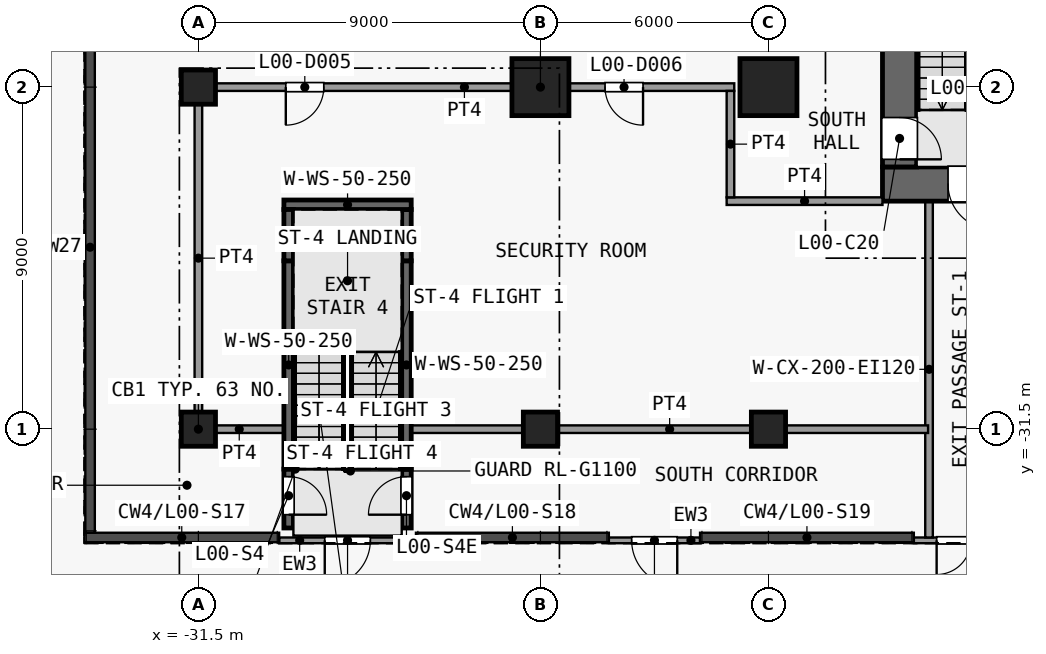
"""IFC4 building model, lengths in metres.
Left out: names, types, materials, properties, quantities, classifications, styles, units other than length and angle.
Written with IfcOpenShell. Run it as: python <this file> out.ifc"""

import sys

from ifc_helpers import new_model, si_unit, direction, frame, frame_2d, origin, origin_2d, place, context, subcontext, project, spatial, rectangle, extrude, element, fill, save


model = new_model("IFC4")
c1 = context("Model", 3, precision=1e-05, world=origin(), true_north=direction((0.0, 1.0)))
c2 = subcontext(c1, "Body", "Model", "MODEL_VIEW")
j1 = project(units=[si_unit("LENGTHUNIT", "METRE"), si_unit("PLANEANGLEUNIT", "RADIAN")], contexts=[c1])
p1 = place(None, origin())
s1 = spatial("IfcSite", under=j1, at=p1, CompositionType="ELEMENT")
p2 = place(p1, origin())
s2 = spatial("IfcBuilding", under=s1, at=p2, CompositionType="ELEMENT")
p3 = place(p2, origin())
s3 = spatial("IfcBuildingStorey", under=s2, at=p3, CompositionType="ELEMENT", Elevation=0.0)
for number, where, z_axis, x_axis in (
    (1, (-31.5, -31.5, 0.0), (0.0, 0.0, 1.0), (1.0, 0.0, 0.0)),
    (2, (-31.5, -22.5, 0.0), (0.0, 0.0, 1.0), (1.0, 0.0, 0.0)),
    (3, (-22.5, -31.5, 0.0), (0.0, 0.0, 1.0), (1.0, 0.0, 0.0)),
):
    element("IfcColumn", number, at=place(p3, frame(where, z_axis=z_axis, x_axis=x_axis)), inside=s3, PredefinedType="COLUMN", context=c2, shape_type="SweptSolid", body=[
        extrude(rectangle(XDim=0.9, YDim=0.9, at=origin_2d()), origin(), (0.0, 0.0, 1.0), 8.0),
    ])
p4 = place(p3, frame((-22.5, -22.5, 0.0), z_axis=(0.0, 0.0, 1.0), x_axis=(1.0, 0.0, 0.0)))
e4 = element("IfcColumn", 4, at=p4, inside=s3, PredefinedType="COLUMN", context=c2, shape_type="SweptSolid", body=[
    extrude(rectangle(XDim=1.5, YDim=1.5, at=origin_2d()), origin(), (0.0, 0.0, 1.0), 8.0),
])
p5 = place(p3, frame((-16.5, -31.5, 0.0), z_axis=(0.0, 0.0, 1.0), x_axis=(1.0, 0.0, 0.0)))
e5 = element("IfcColumn", 5, at=p5, inside=s3, PredefinedType="COLUMN", context=c2, shape_type="SweptSolid", body=[
    extrude(rectangle(XDim=0.9, YDim=0.9, at=origin_2d()), origin(), (0.0, 0.0, 1.0), 8.0),
])
p6 = place(p3, frame((-16.5, -22.5, 0.0), z_axis=(0.0, 0.0, 1.0), x_axis=(1.0, 0.0, 0.0)))
e6 = element("IfcColumn", 6, at=p6, inside=s3, PredefinedType="COLUMN", context=c2, shape_type="SweptSolid", body=[
    extrude(rectangle(XDim=1.5, YDim=1.5, at=origin_2d()), origin(), (0.0, 0.0, 1.0), 8.0),
])
p7 = place(p3, frame((13.5, -25.05, 0.0), z_axis=(0.0, 0.0, 1.0), x_axis=(-1.0, 0.0, 0.0)))
e7 = element("IfcWall", 7, at=p7, inside=s3, PredefinedType="SHEAR", context=c2, shape_type="SweptSolid", body=[
    extrude(rectangle(XDim=27.0, YDim=0.9, at=frame_2d((13.5, 0.0))), origin(), (0.0, 0.0, 1.0), 7.65),
])
p8 = place(p7, frame((24.075, 0.0, 0.0)))
e8 = element("IfcOpeningElement", 8, at=p8, cuts=e7, PredefinedType="OPENING", context=c2, shape_type="SweptSolid", body=[
    extrude(rectangle(XDim=1.2, YDim=2.1, at=frame_2d((0.6, 1.05))), frame((0.0, 0.46, 0.0), z_axis=(0.0, -1.0, 0.0), x_axis=(1.0, 0.0, 0.0)), (0.0, 0.0, 1.0), 0.92),
])
p9 = place(p7, frame((1.725, 0.0, 0.0)))
e9 = element("IfcOpeningElement", 9, at=p9, cuts=e7, PredefinedType="OPENING", context=c2, shape_type="SweptSolid", body=[
    extrude(rectangle(XDim=1.2, YDim=2.1, at=frame_2d((0.6, 1.05))), frame((0.0, 0.46, 0.0), z_axis=(0.0, -1.0, 0.0), x_axis=(1.0, 0.0, 0.0)), (0.0, 0.0, 1.0), 0.92),
])
p10 = place(p3, frame((-13.05, -8.5, 0.0), z_axis=(0.0, 0.0, 1.0), x_axis=(0.0, -1.0, 0.0)))
e10 = element("IfcWall", 10, at=p10, inside=s3, PredefinedType="SHEAR", context=c2, shape_type="SweptSolid", body=[
    extrude(rectangle(XDim=16.1, YDim=0.9, at=frame_2d((8.05, 0.0))), origin(), (0.0, 0.0, 1.0), 7.65),
])
p11 = place(p10, frame((14.8, 0.0, 0.0)))
e11 = element("IfcOpeningElement", 11, at=p11, cuts=e10, PredefinedType="OPENING", context=c2, shape_type="SweptSolid", body=[
    extrude(rectangle(XDim=1.1, YDim=2.1, at=frame_2d((0.55, 1.05))), frame((0.0, 0.46, 0.0), z_axis=(0.0, -1.0, 0.0), x_axis=(1.0, 0.0, 0.0)), (0.0, 0.0, 1.0), 0.92),
])
p12 = place(p3, frame((-12.275, -25.5, 0.0), z_axis=(0.0, 0.0, 1.0), x_axis=(0.0, -1.0, 0.0)))
e12 = element("IfcWall", 12, at=p12, inside=s3, PredefinedType="PARTITIONING", context=c2, shape_type="SweptSolid", body=[
    extrude(rectangle(XDim=8.85, YDim=0.2, at=frame_2d((4.425, 0.0))), origin(), (0.0, 0.0, 1.0), 7.65),
])
p13 = place(p3, frame((-9.675, -34.425, 0.0), z_axis=(0.0, 0.0, 1.0), x_axis=(-1.0, 0.0, 0.0)))
e13 = element("IfcWall", 13, at=p13, inside=s3, PredefinedType="SOLIDWALL", context=c2, shape_type="SweptSolid", body=[
    extrude(rectangle(XDim=3.0, YDim=0.15, at=frame_2d((1.5, 0.0))), origin(), (0.0, 0.0, 1.0), 7.65),
])
p14 = place(p13, frame((0.6, 0.0, 0.0)))
e14 = element("IfcOpeningElement", 14, at=p14, cuts=e13, PredefinedType="OPENING", context=c2, shape_type="SweptSolid", body=[
    extrude(rectangle(XDim=1.8, YDim=2.1, at=frame_2d((0.9, 1.05))), frame((0.0, 0.085, 0.0), z_axis=(0.0, -1.0, 0.0), x_axis=(1.0, 0.0, 0.0)), (0.0, 0.0, 1.0), 0.17),
])
p15 = place(p3, frame((-25.775, -34.425, 0.0), z_axis=(0.0, 0.0, 1.0), x_axis=(-1.0, 0.0, 0.0)))
e15 = element("IfcWall", 15, at=p15, inside=s3, PredefinedType="SOLIDWALL", context=c2, shape_type="SweptSolid", body=[
    extrude(rectangle(XDim=3.6, YDim=0.15, at=frame_2d((1.8, 0.0))), origin(), (0.0, 0.0, 1.0), 7.65),
])
p16 = place(p15, frame((1.2, 0.0, 0.0)))
e16 = element("IfcOpeningElement", 16, at=p16, cuts=e15, PredefinedType="OPENING", context=c2, shape_type="SweptSolid", body=[
    extrude(rectangle(XDim=1.2, YDim=2.4, at=frame_2d((0.6, 1.2))), frame((0.0, 0.085, 0.0), z_axis=(0.0, -1.0, 0.0), x_axis=(1.0, 0.0, 0.0)), (0.0, 0.0, 1.0), 0.17),
])
p17 = place(p3, frame((-18.3, -34.425, 0.0), z_axis=(0.0, 0.0, 1.0), x_axis=(-1.0, 0.0, 0.0)))
e17 = element("IfcWall", 17, at=p17, inside=s3, PredefinedType="SOLIDWALL", context=c2, shape_type="SweptSolid", body=[
    extrude(rectangle(XDim=2.4, YDim=0.15, at=frame_2d((1.2, 0.0))), origin(), (0.0, 0.0, 1.0), 7.65),
])
p18 = place(p17, frame((0.6, 0.0, 0.0)))
e18 = element("IfcOpeningElement", 18, at=p18, cuts=e17, PredefinedType="OPENING", context=c2, shape_type="SweptSolid", body=[
    extrude(rectangle(XDim=1.2, YDim=2.4, at=frame_2d((0.6, 1.2))), frame((0.0, 0.085, 0.0), z_axis=(0.0, -1.0, 0.0), x_axis=(1.0, 0.0, 0.0)), (0.0, 0.0, 1.0), 0.17),
])
p19 = place(p3, frame((-29.125, -32.55, 0.0), z_axis=(0.0, 0.0, 1.0), x_axis=(0.0, -1.0, 0.0)))
e19 = element("IfcWall", 19, at=p19, inside=s3, PredefinedType="SHEAR", context=c2, shape_type="SweptSolid", body=[
    extrude(rectangle(XDim=1.55, YDim=0.25, at=frame_2d((0.775, 0.0))), origin(), (0.0, 0.0, 1.0), 7.65),
])
p20 = place(p19, frame((0.2, 0.0, 0.0)))
e20 = element("IfcOpeningElement", 20, at=p20, cuts=e19, PredefinedType="OPENING", context=c2, shape_type="SweptSolid", body=[
    extrude(rectangle(XDim=1.0, YDim=2.1, at=frame_2d((0.5, 1.05))), frame((0.0, 0.135, 0.0), z_axis=(0.0, -1.0, 0.0), x_axis=(1.0, 0.0, 0.0)), (0.0, 0.0, 1.0), 0.27),
])
p21 = place(p3, frame((-29.125, -32.55, 0.0), z_axis=(0.0, 0.0, 1.0), x_axis=(0.0, 1.0, 0.0)))
e21 = element("IfcWall", 21, at=p21, inside=s3, PredefinedType="SHEAR", context=c2, shape_type="SweptSolid", body=[
    extrude(rectangle(XDim=5.48, YDim=0.25, at=frame_2d((2.74, 0.0))), origin(), (0.0, 0.0, 1.0), 7.65),
])
p22 = place(p3, frame((-29.125, -27.07, 0.0), z_axis=(0.0, 0.0, 1.0), x_axis=(0.0, 1.0, 0.0)))
e22 = element("IfcWall", 22, at=p22, inside=s3, PredefinedType="SHEAR", context=c2, shape_type="SweptSolid", body=[
    extrude(rectangle(XDim=1.35, YDim=0.25, at=frame_2d((0.675, 0.0))), origin(), (0.0, 0.0, 1.0), 7.65),
])
p23 = place(p3, frame((-26.025, -34.1, 0.0), z_axis=(0.0, 0.0, 1.0), x_axis=(0.0, 1.0, 0.0)))
e23 = element("IfcWall", 23, at=p23, inside=s3, PredefinedType="SHEAR", context=c2, shape_type="SweptSolid", body=[
    extrude(rectangle(XDim=1.55, YDim=0.25, at=frame_2d((0.775, 0.0))), origin(), (0.0, 0.0, 1.0), 7.65),
])
p24 = place(p23, frame((0.35, 0.0, 0.0)))
e24 = element("IfcOpeningElement", 24, at=p24, cuts=e23, PredefinedType="OPENING", context=c2, shape_type="SweptSolid", body=[
    extrude(rectangle(XDim=1.0, YDim=2.1, at=frame_2d((0.5, 1.05))), frame((0.0, 0.135, 0.0), z_axis=(0.0, -1.0, 0.0), x_axis=(1.0, 0.0, 0.0)), (0.0, 0.0, 1.0), 0.27),
])
p25 = place(p3, frame((-26.025, -32.55, 0.0), z_axis=(0.0, 0.0, 1.0), x_axis=(0.0, 1.0, 0.0)))
e25 = element("IfcWall", 25, at=p25, inside=s3, PredefinedType="SHEAR", context=c2, shape_type="SweptSolid", body=[
    extrude(rectangle(XDim=5.48, YDim=0.25, at=frame_2d((2.74, 0.0))), origin(), (0.0, 0.0, 1.0), 7.65),
])
p26 = place(p3, frame((-26.025, -27.07, 0.0), z_axis=(0.0, 0.0, 1.0), x_axis=(0.0, 1.0, 0.0)))
e26 = element("IfcWall", 26, at=p26, inside=s3, PredefinedType="SHEAR", context=c2, shape_type="SweptSolid", body=[
    extrude(rectangle(XDim=1.35, YDim=0.25, at=frame_2d((0.675, 0.0))), origin(), (0.0, 0.0, 1.0), 7.65),
])
p27 = place(p3, frame((-29.25, -25.595, 0.0), z_axis=(0.0, 0.0, 1.0), x_axis=(1.0, 0.0, 0.0)))
e27 = element("IfcWall", 27, at=p27, inside=s3, PredefinedType="SHEAR", context=c2, shape_type="SweptSolid", body=[
    extrude(rectangle(XDim=3.35, YDim=0.25, at=frame_2d((1.675, 0.0))), origin(), (0.0, 0.0, 1.0), 7.65),
])
p28 = place(p3, frame((-31.6, -31.5, 0.0), z_axis=(0.0, 0.0, 1.0), x_axis=(1.0, 0.0, 0.0)))
e28 = element("IfcWall", 28, at=p28, inside=s3, PredefinedType="PARTITIONING", context=c2, shape_type="SweptSolid", body=[
    extrude(rectangle(XDim=2.35, YDim=0.2, at=frame_2d((1.175, 0.0))), origin(), (0.0, 0.0, 1.0), 7.65),
])
p29 = place(p3, frame((-25.9, -31.5, 0.0), z_axis=(0.0, 0.0, 1.0), x_axis=(1.0, 0.0, 0.0)))
e29 = element("IfcWall", 29, at=p29, inside=s3, PredefinedType="PARTITIONING", context=c2, shape_type="SweptSolid", body=[
    extrude(rectangle(XDim=13.6, YDim=0.2, at=frame_2d((6.8, 0.0))), origin(), (0.0, 0.0, 1.0), 7.65),
])
p30 = place(p3, frame((-17.6, -25.5, 0.0), z_axis=(0.0, 0.0, 1.0), x_axis=(1.0, 0.0, 0.0)))
e30 = element("IfcWall", 30, at=p30, inside=s3, PredefinedType="PARTITIONING", context=c2, shape_type="SweptSolid", body=[
    extrude(rectangle(XDim=4.1, YDim=0.2, at=frame_2d((2.05, 0.0))), origin(), (0.0, 0.0, 1.0), 7.65),
])
p31 = place(p3, frame((-31.6, -22.5, 0.0), z_axis=(0.0, 0.0, 1.0), x_axis=(1.0, 0.0, 0.0)))
e31 = element("IfcWall", 31, at=p31, inside=s3, PredefinedType="PARTITIONING", context=c2, shape_type="SweptSolid", body=[
    extrude(rectangle(XDim=14.2, YDim=0.2, at=frame_2d((7.1, 0.0))), origin(), (0.0, 0.0, 1.0), 7.65),
])
p32 = place(p31, frame((2.4, 0.0, 0.0)))
e32 = element("IfcOpeningElement", 32, at=p32, cuts=e31, PredefinedType="OPENING", context=c2, shape_type="SweptSolid", body=[
    extrude(rectangle(XDim=1.0, YDim=2.1, at=frame_2d((0.5, 1.05))), frame((0.0, 0.11, 0.0), z_axis=(0.0, -1.0, 0.0), x_axis=(1.0, 0.0, 0.0)), (0.0, 0.0, 1.0), 0.22),
])
p33 = place(p31, frame((10.8, 0.0, 0.0)))
e33 = element("IfcOpeningElement", 33, at=p33, cuts=e31, PredefinedType="OPENING", context=c2, shape_type="SweptSolid", body=[
    extrude(rectangle(XDim=1.0, YDim=2.1, at=frame_2d((0.5, 1.05))), frame((0.0, 0.11, 0.0), z_axis=(0.0, -1.0, 0.0), x_axis=(1.0, 0.0, 0.0)), (0.0, 0.0, 1.0), 0.22),
])
p34 = place(p3, frame((-31.5, -31.4, 0.0), z_axis=(0.0, 0.0, 1.0), x_axis=(0.0, 1.0, 0.0)))
e34 = element("IfcWall", 34, at=p34, inside=s3, PredefinedType="PARTITIONING", context=c2, shape_type="SweptSolid", body=[
    extrude(rectangle(XDim=8.8, YDim=0.2, at=frame_2d((4.4, 0.0))), origin(), (0.0, 0.0, 1.0), 7.65),
])
p35 = place(p3, frame((-17.5, -25.4, 0.0), z_axis=(0.0, 0.0, 1.0), x_axis=(0.0, 1.0, 0.0)))
e35 = element("IfcWall", 35, at=p35, inside=s3, PredefinedType="PARTITIONING", context=c2, shape_type="SweptSolid", body=[
    extrude(rectangle(XDim=2.8, YDim=0.2, at=frame_2d((1.4, 0.0))), origin(), (0.0, 0.0, 1.0), 7.65),
])
p36 = place(p8, origin())
e36 = element("IfcDoor", 36, at=p36, inside=s3, OperationType="SINGLE_SWING_LEFT", PredefinedType="DOOR", context=c2, shape_type="SweptSolid", body=[
    extrude(rectangle(XDim=1.2, YDim=2.1, at=frame_2d((0.6, 1.05))), frame((0.0, 0.025, 0.0), z_axis=(0.0, -1.0, 0.0), x_axis=(1.0, 0.0, 0.0)), (0.0, 0.0, 1.0), 0.05),
])
fill(e8, e36)
p37 = place(p11, origin())
e37 = element("IfcDoor", 37, at=p37, inside=s3, OperationType="SINGLE_SWING_RIGHT", PredefinedType="DOOR", context=c2, shape_type="SweptSolid", body=[
    extrude(rectangle(XDim=1.1, YDim=2.1, at=frame_2d((0.55, 1.05))), frame((0.0, 0.025, 0.0), z_axis=(0.0, -1.0, 0.0), x_axis=(1.0, 0.0, 0.0)), (0.0, 0.0, 1.0), 0.05),
])
fill(e11, e37)
p38 = place(p14, origin())
e38 = element("IfcDoor", 38, at=p38, inside=s3, OperationType="DOUBLE_DOOR_SINGLE_SWING", PredefinedType="DOOR", context=c2, shape_type="SweptSolid", body=[
    extrude(rectangle(XDim=1.8, YDim=2.1, at=frame_2d((0.9, 1.05))), frame((0.0, 0.025, 0.0), z_axis=(0.0, -1.0, 0.0), x_axis=(1.0, 0.0, 0.0)), (0.0, 0.0, 1.0), 0.05),
])
fill(e14, e38)
p39 = place(p16, origin())
e39 = element("IfcDoor", 39, at=p39, inside=s3, OperationType="SINGLE_SWING_RIGHT", PredefinedType="DOOR", context=c2, shape_type="SweptSolid", body=[
    extrude(rectangle(XDim=1.2, YDim=2.4, at=frame_2d((0.6, 1.2))), frame((0.0, 0.025, 0.0), z_axis=(0.0, -1.0, 0.0), x_axis=(1.0, 0.0, 0.0)), (0.0, 0.0, 1.0), 0.05),
])
fill(e16, e39)
p40 = place(p18, origin())
e40 = element("IfcDoor", 40, at=p40, inside=s3, OperationType="SINGLE_SWING_LEFT", PredefinedType="DOOR", context=c2, shape_type="SweptSolid", body=[
    extrude(rectangle(XDim=1.2, YDim=2.4, at=frame_2d((0.6, 1.2))), frame((0.0, 0.025, 0.0), z_axis=(0.0, -1.0, 0.0), x_axis=(1.0, 0.0, 0.0)), (0.0, 0.0, 1.0), 0.05),
])
fill(e18, e40)
p41 = place(p20, origin())
e41 = element("IfcDoor", 41, at=p41, inside=s3, OperationType="SINGLE_SWING_RIGHT", PredefinedType="DOOR", context=c2, shape_type="SweptSolid", body=[
    extrude(rectangle(XDim=1.0, YDim=2.1, at=frame_2d((0.5, 1.05))), frame((0.0, 0.025, 0.0), z_axis=(0.0, -1.0, 0.0), x_axis=(1.0, 0.0, 0.0)), (0.0, 0.0, 1.0), 0.05),
])
fill(e20, e41)
p42 = place(p24, origin())
e42 = element("IfcDoor", 42, at=p42, inside=s3, OperationType="SINGLE_SWING_LEFT", PredefinedType="DOOR", context=c2, shape_type="SweptSolid", body=[
    extrude(rectangle(XDim=1.0, YDim=2.1, at=frame_2d((0.5, 1.05))), frame((0.0, 0.025, 0.0), z_axis=(0.0, -1.0, 0.0), x_axis=(1.0, 0.0, 0.0)), (0.0, 0.0, 1.0), 0.05),
])
fill(e24, e42)
p43 = place(p32, origin())
e43 = element("IfcDoor", 43, at=p43, inside=s3, OperationType="SINGLE_SWING_LEFT", PredefinedType="DOOR", context=c2, shape_type="SweptSolid", body=[
    extrude(rectangle(XDim=1.0, YDim=2.1, at=frame_2d((0.5, 1.05))), frame((0.0, 0.025, 0.0), z_axis=(0.0, -1.0, 0.0), x_axis=(1.0, 0.0, 0.0)), (0.0, 0.0, 1.0), 0.05),
])
fill(e32, e43)
p44 = place(p33, origin())
e44 = element("IfcDoor", 44, at=p44, inside=s3, OperationType="SINGLE_SWING_RIGHT", PredefinedType="DOOR", context=c2, shape_type="SweptSolid", body=[
    extrude(rectangle(XDim=1.0, YDim=2.1, at=frame_2d((0.5, 1.05))), frame((0.0, 0.025, 0.0), z_axis=(0.0, -1.0, 0.0), x_axis=(1.0, 0.0, 0.0)), (0.0, 0.0, 1.0), 0.05),
])
fill(e33, e44)
save(model, sys.argv[1])
